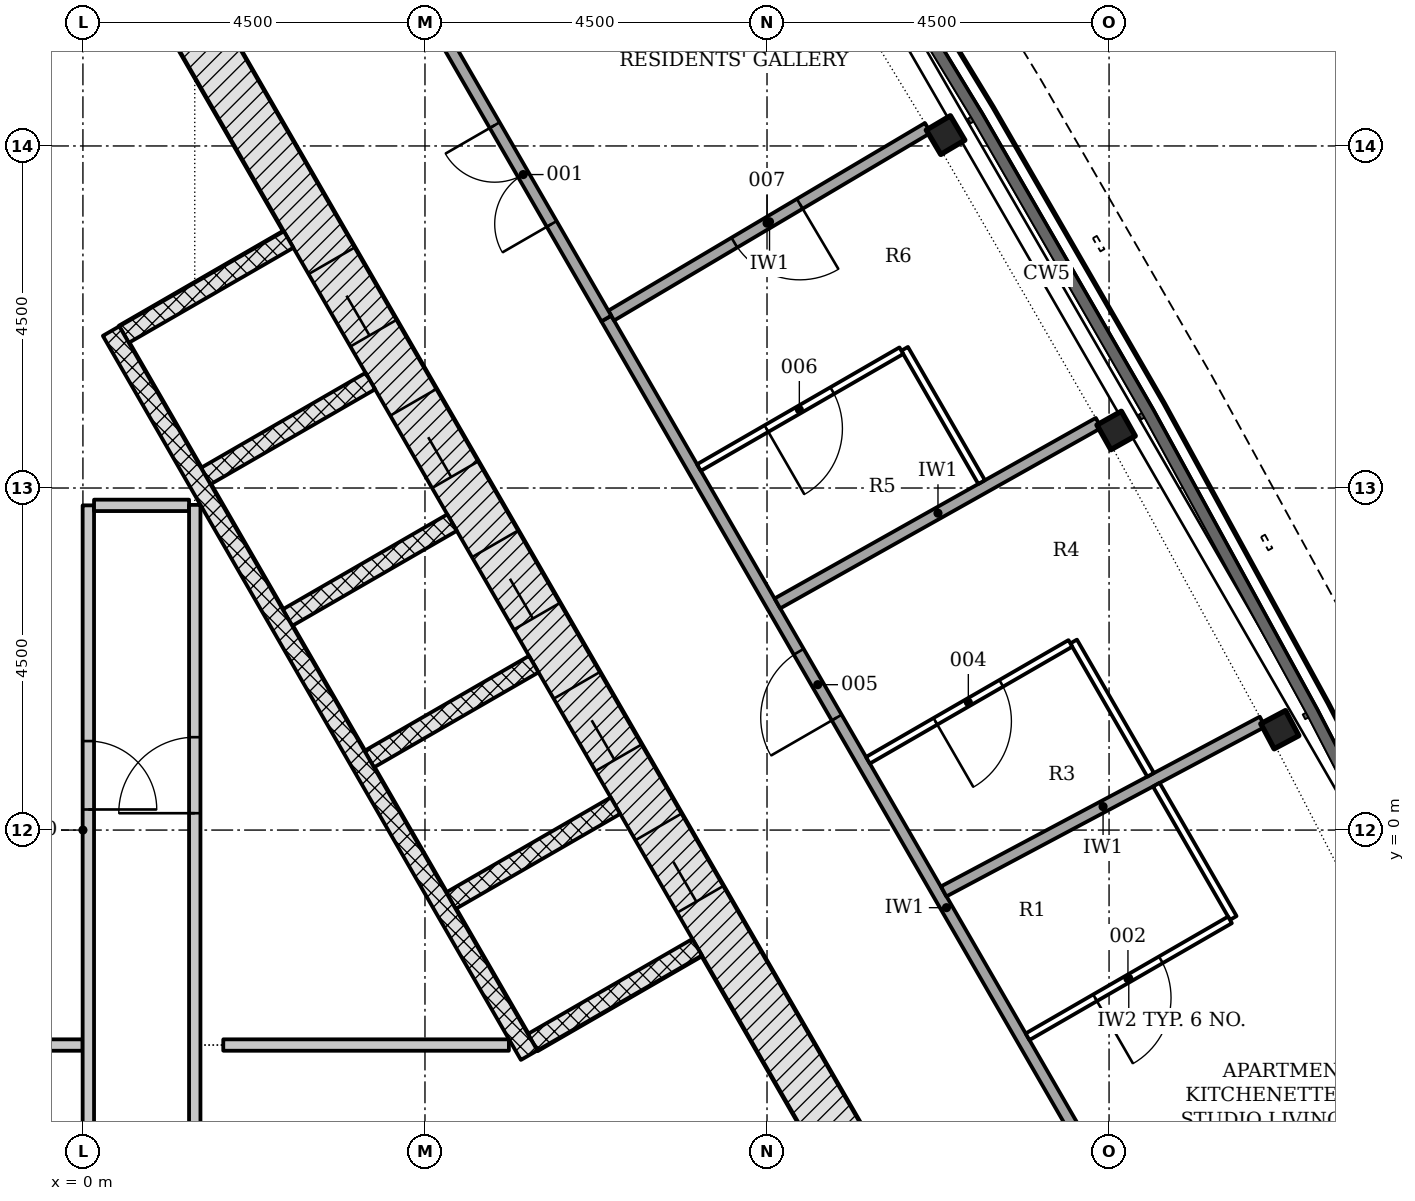
"""IFC4 building model, lengths in metres.
Left out: names, types, materials, properties, quantities, classifications, styles, units other than length and angle.
Written with IfcOpenShell. Run it as: python <this file> out.ifc"""

import sys

from ifc_helpers import new_model, si_unit, direction, frame, frame_2d, origin, origin_2d, place, context, subcontext, project, spatial, polyline, rectangle, i_section, outline, extrude, element, fill, save


model = new_model("IFC4")
c1 = context("Model", 3, precision=1e-05, world=origin(), true_north=direction((0.0, 1.0)))
c2 = subcontext(c1, "Body", "Model", "MODEL_VIEW")
j1 = project(units=[si_unit("LENGTHUNIT", "METRE"), si_unit("PLANEANGLEUNIT", "RADIAN")], contexts=[c1])
p1 = place(None, origin())
s1 = spatial("IfcSite", under=j1, at=p1, CompositionType="ELEMENT")
p2 = place(p1, origin())
s2 = spatial("IfcBuilding", under=s1, at=p2, CompositionType="ELEMENT")
p3 = place(p2, frame((0.0, 0.0, 240.0)))
s3 = spatial("IfcBuildingStorey", under=s2, at=p3, CompositionType="ELEMENT", Elevation=240.0)
p4 = place(p3, frame((10.311, -4.703, -0.2), z_axis=(0.0, 0.0, 1.0), x_axis=(-0.500001446645, 0.866024568562, 0.0)))
e1 = element("IfcWall", 1, at=p4, inside=s3, PredefinedType="SHEAR", context=c2, shape_type="SweptSolid", body=[
    extrude(rectangle(XDim=18.458, YDim=0.7, at=frame_2d((9.229, 0.0))), origin(), (0.0, 0.0, 1.0), 3.6),
])
p5 = place(p4, frame((4.379, 0.0, 0.2)))
e2 = element("IfcOpeningElement", 2, at=p5, cuts=e1, PredefinedType="OPENING", context=c2, shape_type="SweptSolid", body=[
    extrude(rectangle(XDim=1.1, YDim=2.1, at=frame_2d((0.55, 1.05))), frame((0.0, 0.36, 0.0), z_axis=(0.0, -1.0, 0.0), x_axis=(1.0, 0.0, 0.0)), (0.0, 0.0, 1.0), 0.72),
])
p6 = place(p4, frame((6.529, 0.0, 0.2)))
e3 = element("IfcOpeningElement", 3, at=p6, cuts=e1, PredefinedType="OPENING", context=c2, shape_type="SweptSolid", body=[
    extrude(rectangle(XDim=1.1, YDim=2.1, at=frame_2d((0.55, 1.05))), frame((0.0, 0.36, 0.0), z_axis=(0.0, -1.0, 0.0), x_axis=(1.0, 0.0, 0.0)), (0.0, 0.0, 1.0), 0.72),
])
p7 = place(p4, frame((8.679, 0.0, 0.2)))
e4 = element("IfcOpeningElement", 4, at=p7, cuts=e1, PredefinedType="OPENING", context=c2, shape_type="SweptSolid", body=[
    extrude(rectangle(XDim=1.1, YDim=2.1, at=frame_2d((0.55, 1.05))), frame((0.0, 0.36, 0.0), z_axis=(0.0, -1.0, 0.0), x_axis=(1.0, 0.0, 0.0)), (0.0, 0.0, 1.0), 0.72),
])
p8 = place(p4, frame((10.829, 0.0, 0.2)))
e5 = element("IfcOpeningElement", 5, at=p8, cuts=e1, PredefinedType="OPENING", context=c2, shape_type="SweptSolid", body=[
    extrude(rectangle(XDim=1.1, YDim=2.1, at=frame_2d((0.55, 1.05))), frame((0.0, 0.36, 0.0), z_axis=(0.0, -1.0, 0.0), x_axis=(1.0, 0.0, 0.0)), (0.0, 0.0, 1.0), 0.72),
])
p9 = place(p4, frame((12.979, 0.0, 0.2)))
e6 = element("IfcOpeningElement", 6, at=p9, cuts=e1, PredefinedType="OPENING", context=c2, shape_type="SweptSolid", body=[
    extrude(rectangle(XDim=1.1, YDim=2.1, at=frame_2d((0.55, 1.05))), frame((0.0, 0.36, 0.0), z_axis=(0.0, -1.0, 0.0), x_axis=(1.0, 0.0, 0.0)), (0.0, 0.0, 1.0), 0.72),
])
for number, where, z_axis, x_axis in (
    (7, (15.747, 1.32, -0.2), (0.0, 0.0, 1.0), (-0.47, 0.883, 0.0)),
    (8, (13.593, 5.257, -0.2), (0.0, 0.0, 1.0), (-0.49, 0.872, 0.0)),
    (9, (11.349, 9.143, -0.2), (0.0, 0.0, 1.0), (-0.51, 0.86, 0.0)),
):
    element("IfcColumn", number, at=place(p3, frame(where, z_axis=z_axis, x_axis=x_axis)), inside=s3, PredefinedType="COLUMN", context=c2, shape_type="SweptSolid", body=[
        extrude(i_section(OverallWidth=0.373, OverallDepth=0.368, WebThickness=0.015, FlangeThickness=0.024, FilletRadius=0.015, at=origin_2d()), origin(), (0.0, 0.0, 1.0), 3.6),
    ])
p10 = place(p3, origin())
e10 = element("IfcWall", 10, at=p10, inside=s3, PredefinedType="NOTDEFINED", context=c2, shape_type="SweptSolid", body=[
    extrude(outline(polyline([(11.244, -14.641), (13.789, -14.478), (15.241, -14.215), (16.602, -13.646), (17.809, -12.798), (18.804, -11.708), (19.542, -10.431), (19.987, -9.024), (20.119, -7.555), (19.931, -6.091), (19.433, -4.702), (18.301, -2.417), (18.032, -2.55), (19.156, -4.82), (19.638, -6.162), (19.817, -7.56), (19.691, -8.965), (19.266, -10.309), (18.561, -11.53), (17.609, -12.571), (16.456, -13.382), (15.155, -13.926), (13.752, -14.18), (11.225, -14.341), (11.244, -14.641)])), origin(), (0.0, 0.0, 1.0), 3.3),
])
for number, where, z_axis, x_axis in (
    (11, (8.081, -1.541, -0.2), (0.0, 0.0, 1.0), (-0.866, -0.5, 0.0)),
    (12, (7.006, 0.321, -0.2), (0.0, 0.0, 1.0), (-0.866, -0.5, 0.0)),
):
    element("IfcWall", number, at=place(p3, frame(where, z_axis=z_axis, x_axis=x_axis)), inside=s3, PredefinedType="PARTITIONING", context=c2, shape_type="SweptSolid", body=[
        extrude(rectangle(XDim=2.5, YDim=0.25, at=frame_2d((1.25, 0.0))), origin(), (0.0, 0.0, 1.0), 3.6),
    ])
p11 = place(p3, frame((5.931, 2.183, -0.2), z_axis=(0.0, 0.0, 1.0), x_axis=(-0.866047370643, -0.499961950354, 0.0)))
e13 = element("IfcWall", 13, at=p11, inside=s3, PredefinedType="PARTITIONING", context=c2, shape_type="SweptSolid", body=[
    extrude(rectangle(XDim=2.5, YDim=0.25, at=frame_2d((1.25, 0.0))), origin(), (0.0, 0.0, 1.0), 3.6),
])
for number, where, z_axis, x_axis in (
    (14, (4.856, 4.045, -0.2), (0.0, 0.0, 1.0), (-0.866, -0.5, 0.0)),
    (15, (3.781, 5.907, -0.2), (0.0, 0.0, 1.0), (-0.866, -0.5, 0.0)),
    (16, (2.706, 7.769, -0.2), (0.0, 0.0, 1.0), (-0.866, -0.5, 0.0)),
):
    element("IfcWall", number, at=place(p3, frame(where, z_axis=z_axis, x_axis=x_axis)), inside=s3, PredefinedType="PARTITIONING", context=c2, shape_type="SweptSolid", body=[
        extrude(rectangle(XDim=2.5, YDim=0.25, at=frame_2d((1.25, 0.0))), origin(), (0.0, 0.0, 1.0), 3.6),
    ])
p12 = place(p3, frame((5.87, -2.961, 0.0), z_axis=(0.0, 0.0, 1.0), x_axis=(-0.50000615651, 0.866021849293, 0.0)))
e17 = element("IfcWall", 17, at=p12, inside=s3, PredefinedType="PARTITIONING", context=c2, shape_type="SweptSolid", body=[
    extrude(rectangle(XDim=11.0, YDim=0.25, at=frame_2d((5.5, 0.0))), origin(), (0.0, 0.0, 1.0), 3.4),
])
p13 = place(p3, frame((-5.142, -2.828, 0.0), z_axis=(0.0, 0.0, 1.0), x_axis=(1.0, 0.0, 0.0)))
e18 = element("IfcWall", 18, at=p13, inside=s3, PredefinedType="PARTITIONING", context=c2, shape_type="SweptSolid", body=[
    extrude(rectangle(XDim=5.139, YDim=0.15, at=frame_2d((2.569, 0.0))), origin(), (0.0, 0.0, 1.0), 3.4),
])
p14 = place(p3, frame((0.071, 4.272, 0.0), z_axis=(0.0, 0.0, 1.0), x_axis=(0.0, -1.0, 0.0)))
e19 = element("IfcWall", 19, at=p14, inside=s3, PredefinedType="PARTITIONING", context=c2, shape_type="SweptSolid", body=[
    extrude(rectangle(XDim=10.5, YDim=0.15, at=frame_2d((5.25, 0.0))), origin(), (0.0, 0.0, 1.0), 3.4),
])
p15 = place(p14, frame((3.101, 0.0, 0.0)))
e20 = element("IfcOpeningElement", 20, at=p15, cuts=e19, PredefinedType="OPENING", context=c2, shape_type="SweptSolid", body=[
    extrude(rectangle(XDim=0.9, YDim=2.1, at=frame_2d((0.45, 1.05))), frame((0.0, 0.085, 0.0), z_axis=(0.0, -1.0, 0.0), x_axis=(1.0, 0.0, 0.0)), (0.0, 0.0, 1.0), 0.17),
])
p16 = place(p3, frame((0.146, 4.272, 0.0), z_axis=(0.0, 0.0, 1.0), x_axis=(1.0, 0.0, 0.0)))
e21 = element("IfcWall", 21, at=p16, inside=s3, PredefinedType="PARTITIONING", context=c2, shape_type="SweptSolid", body=[
    extrude(rectangle(XDim=1.25, YDim=0.15, at=frame_2d((0.625, 0.0))), origin(), (0.0, 0.0, 1.0), 3.4),
])
p17 = place(p3, frame((1.471, -5.928, 0.0), z_axis=(0.0, 0.0, 1.0), x_axis=(0.0, 1.0, 0.0)))
e22 = element("IfcWall", 22, at=p17, inside=s3, PredefinedType="PARTITIONING", context=c2, shape_type="SweptSolid", body=[
    extrude(rectangle(XDim=10.206, YDim=0.15, at=frame_2d((5.103, 0.0))), origin(), (0.0, 0.0, 1.0), 3.4),
])
p18 = place(p17, frame((6.15, 0.0, 0.0)))
e23 = element("IfcOpeningElement", 23, at=p18, cuts=e22, PredefinedType="OPENING", context=c2, shape_type="SweptSolid", body=[
    extrude(rectangle(XDim=1.0, YDim=2.1, at=frame_2d((0.5, 1.05))), frame((0.0, 0.085, 0.0), z_axis=(0.0, -1.0, 0.0), x_axis=(1.0, 0.0, 0.0)), (0.0, 0.0, 1.0), 0.17),
])
p19 = place(p3, frame((1.846, -2.828, 0.0), z_axis=(0.0, 0.0, 1.0), x_axis=(1.0, 0.0, 0.0)))
e24 = element("IfcWall", 24, at=p19, inside=s3, PredefinedType="PARTITIONING", context=c2, shape_type="SweptSolid", body=[
    extrude(rectangle(XDim=3.758, YDim=0.15, at=frame_2d((1.879, 0.0))), origin(), (0.0, 0.0, 1.0), 3.4),
])
p20 = place(p3, frame((15.836, -8.772, 0.0), z_axis=(0.0, 0.0, 1.0), x_axis=(-0.500001479768, 0.866024549438, 0.0)))
e25 = element("IfcWall", 25, at=p20, inside=s3, PredefinedType="PARTITIONING", context=c2, shape_type="SweptSolid", body=[
    extrude(rectangle(XDim=17.9, YDim=0.15, at=frame_2d((8.95, 0.0))), origin(), (0.0, 0.0, 1.0), 2.852),
])
p21 = place(p20, frame((2.973, 0.0, 0.0)))
e26 = element("IfcOpeningElement", 26, at=p21, cuts=e25, PredefinedType="OPENING", context=c2, shape_type="SweptSolid", body=[
    extrude(rectangle(XDim=1.0, YDim=2.1, at=frame_2d((0.5, 1.05))), frame((0.0, 0.085, 0.0), z_axis=(0.0, -1.0, 0.0), x_axis=(1.0, 0.0, 0.0)), (0.0, 0.0, 1.0), 0.17),
])
p22 = place(p20, frame((11.837, 0.0, 0.0)))
e27 = element("IfcOpeningElement", 27, at=p22, cuts=e25, PredefinedType="OPENING", context=c2, shape_type="SweptSolid", body=[
    extrude(rectangle(XDim=1.0, YDim=2.1, at=frame_2d((0.5, 1.05))), frame((0.0, 0.085, 0.0), z_axis=(0.0, -1.0, 0.0), x_axis=(1.0, 0.0, 0.0)), (0.0, 0.0, 1.0), 0.17),
])
p23 = place(p3, frame((11.116, 9.238, 0.0), z_axis=(0.0, 0.0, 1.0), x_axis=(-0.860234203322, -0.509899122803, 0.0)))
e28 = element("IfcWall", 28, at=p23, inside=s3, PredefinedType="PARTITIONING", context=c2, shape_type="SweptSolid", body=[
    extrude(rectangle(XDim=4.843, YDim=0.15, at=frame_2d((2.421, 0.0))), origin(), (0.0, 0.0, 1.0), 3.4),
])
p24 = place(p23, frame((1.959, 0.0, 0.0)))
e29 = element("IfcOpeningElement", 29, at=p24, cuts=e28, PredefinedType="OPENING", context=c2, shape_type="SweptSolid", body=[
    extrude(rectangle(XDim=1.0, YDim=2.1, at=frame_2d((0.5, 1.05))), frame((0.0, 0.085, 0.0), z_axis=(0.0, -1.0, 0.0), x_axis=(1.0, 0.0, 0.0)), (0.0, 0.0, 1.0), 0.17),
])
p25 = place(p3, frame((6.886, 6.73, 0.0), z_axis=(0.0, 0.0, 1.0), x_axis=(-0.499999494409, 0.866025695687, 0.0)))
e30 = element("IfcWall", 30, at=p25, inside=s3, PredefinedType="PARTITIONING", context=c2, shape_type="SweptSolid", body=[
    extrude(rectangle(XDim=4.374, YDim=0.15, at=frame_2d((2.187, 0.0))), origin(), (0.0, 0.0, 1.0), 2.852),
])
p26 = place(p25, frame((1.437, 0.0, 0.0)))
e31 = element("IfcOpeningElement", 31, at=p26, cuts=e30, PredefinedType="OPENING", context=c2, shape_type="SweptSolid", body=[
    extrude(rectangle(XDim=1.5, YDim=2.1, at=frame_2d((0.75, 1.05))), frame((0.0, 0.085, 0.0), z_axis=(0.0, -1.0, 0.0), x_axis=(1.0, 0.0, 0.0)), (0.0, 0.0, 1.0), 0.17),
])
p27 = place(p3, frame((14.122, 0.597, 0.0), z_axis=(0.0, 0.0, 1.0), x_axis=(0.499990325971, -0.866030989016, 0.0)))
e32 = element("IfcWall", 32, at=p27, inside=s3, PredefinedType="PARTITIONING", context=c2, shape_type="SweptSolid", body=[
    extrude(rectangle(XDim=2.025, YDim=0.1, at=frame_2d((1.012, 0.0))), origin(), (0.0, 0.0, 1.0), 2.852),
])
p28 = place(p3, frame((15.091, -1.182, 0.0), z_axis=(0.0, 0.0, 1.0), x_axis=(-0.866016353143, -0.500015675843, 0.0)))
e33 = element("IfcWall", 33, at=p28, inside=s3, PredefinedType="PARTITIONING", context=c2, shape_type="SweptSolid", body=[
    extrude(rectangle(XDim=3.075, YDim=0.1, at=frame_2d((1.538, 0.0))), origin(), (0.0, 0.0, 1.0), 3.4),
])
p29 = place(p28, frame((1.05, 0.0, 0.0)))
e34 = element("IfcOpeningElement", 34, at=p29, cuts=e33, PredefinedType="OPENING", context=c2, shape_type="SweptSolid", body=[
    extrude(rectangle(XDim=1.0, YDim=2.1, at=frame_2d((0.5, 1.05))), frame((0.0, 0.06, 0.0), z_axis=(0.0, -1.0, 0.0), x_axis=(1.0, 0.0, 0.0)), (0.0, 0.0, 1.0), 0.12),
])
p30 = place(p3, frame((15.518, 1.425, 0.0), z_axis=(0.0, 0.0, 1.0), x_axis=(-0.882718227231, -0.469902682812, 0.0)))
e35 = element("IfcWall", 35, at=p30, inside=s3, PredefinedType="PARTITIONING", context=c2, shape_type="SweptSolid", body=[
    extrude(rectangle(XDim=4.751, YDim=0.15, at=frame_2d((2.375, 0.0))), origin(), (0.0, 0.0, 1.0), 3.4),
])
p31 = place(p3, frame((14.047, 0.727, 0.0), z_axis=(0.0, 0.0, 1.0), x_axis=(-0.499990325971, 0.866030989016, 0.0)))
e36 = element("IfcWall", 36, at=p31, inside=s3, PredefinedType="PARTITIONING", context=c2, shape_type="SweptSolid", body=[
    extrude(rectangle(XDim=2.025, YDim=0.1, at=frame_2d((1.012, 0.0))), origin(), (0.0, 0.0, 1.0), 3.4),
])
p32 = place(p3, frame((12.991, 2.456, 0.0), z_axis=(0.0, 0.0, 1.0), x_axis=(-0.866030883713, -0.499990508365, 0.0)))
e37 = element("IfcWall", 37, at=p32, inside=s3, PredefinedType="PARTITIONING", context=c2, shape_type="SweptSolid", body=[
    extrude(rectangle(XDim=3.075, YDim=0.1, at=frame_2d((1.537, 0.0))), origin(), (0.0, 0.0, 1.0), 3.4),
])
p33 = place(p32, frame((1.05, 0.0, 0.0)))
e38 = element("IfcOpeningElement", 38, at=p33, cuts=e37, PredefinedType="OPENING", context=c2, shape_type="SweptSolid", body=[
    extrude(rectangle(XDim=1.0, YDim=2.1, at=frame_2d((0.5, 1.05))), frame((0.0, 0.06, 0.0), z_axis=(0.0, -1.0, 0.0), x_axis=(1.0, 0.0, 0.0)), (0.0, 0.0, 1.0), 0.12),
])
p34 = place(p3, frame((13.362, 5.357, 0.0), z_axis=(0.0, 0.0, 1.0), x_axis=(-0.871708672205, -0.490024479799, 0.0)))
e39 = element("IfcWall", 39, at=p34, inside=s3, PredefinedType="PARTITIONING", context=c2, shape_type="SweptSolid", body=[
    extrude(rectangle(XDim=4.847, YDim=0.15, at=frame_2d((2.424, 0.0))), origin(), (0.0, 0.0, 1.0), 3.4),
])
p35 = place(p3, frame((11.823, 4.578, 0.0), z_axis=(0.0, 0.0, 1.0), x_axis=(-0.499990325971, 0.866030989016, 0.0)))
e40 = element("IfcWall", 40, at=p35, inside=s3, PredefinedType="PARTITIONING", context=c2, shape_type="SweptSolid", body=[
    extrude(rectangle(XDim=2.025, YDim=0.1, at=frame_2d((1.012, 0.0))), origin(), (0.0, 0.0, 1.0), 3.4),
])
p36 = place(p3, frame((10.768, 6.306, 0.0), z_axis=(0.0, 0.0, 1.0), x_axis=(-0.866050731258, -0.499956128963, 0.0)))
e41 = element("IfcWall", 41, at=p36, inside=s3, PredefinedType="PARTITIONING", context=c2, shape_type="SweptSolid", body=[
    extrude(rectangle(XDim=3.075, YDim=0.1, at=frame_2d((1.538, 0.0))), origin(), (0.0, 0.0, 1.0), 3.4),
])
p37 = place(p36, frame((1.05, 0.0, 0.0)))
e42 = element("IfcOpeningElement", 42, at=p37, cuts=e41, PredefinedType="OPENING", context=c2, shape_type="SweptSolid", body=[
    extrude(rectangle(XDim=1.0, YDim=2.1, at=frame_2d((0.5, 1.05))), frame((0.0, 0.06, 0.0), z_axis=(0.0, -1.0, 0.0), x_axis=(1.0, 0.0, 0.0)), (0.0, 0.0, 1.0), 0.12),
])
p38 = place(p5, origin())
e43 = element("IfcDoor", 43, at=p38, inside=s3, OperationType="DOUBLE_DOOR_SLIDING", PredefinedType="DOOR", context=c2, shape_type="SweptSolid", body=[
    extrude(rectangle(XDim=1.1, YDim=2.1, at=frame_2d((0.55, 1.05))), frame((0.0, 0.025, 0.0), z_axis=(0.0, -1.0, 0.0), x_axis=(1.0, 0.0, 0.0)), (0.0, 0.0, 1.0), 0.05),
])
fill(e2, e43)
p39 = place(p6, origin())
e44 = element("IfcDoor", 44, at=p39, inside=s3, OperationType="DOUBLE_DOOR_SLIDING", PredefinedType="DOOR", context=c2, shape_type="SweptSolid", body=[
    extrude(rectangle(XDim=1.1, YDim=2.1, at=frame_2d((0.55, 1.05))), frame((0.0, 0.025, 0.0), z_axis=(0.0, -1.0, 0.0), x_axis=(1.0, 0.0, 0.0)), (0.0, 0.0, 1.0), 0.05),
])
fill(e3, e44)
p40 = place(p7, origin())
e45 = element("IfcDoor", 45, at=p40, inside=s3, OperationType="DOUBLE_DOOR_SLIDING", PredefinedType="DOOR", context=c2, shape_type="SweptSolid", body=[
    extrude(rectangle(XDim=1.1, YDim=2.1, at=frame_2d((0.55, 1.05))), frame((0.0, 0.025, 0.0), z_axis=(0.0, -1.0, 0.0), x_axis=(1.0, 0.0, 0.0)), (0.0, 0.0, 1.0), 0.05),
])
fill(e4, e45)
p41 = place(p8, origin())
e46 = element("IfcDoor", 46, at=p41, inside=s3, OperationType="DOUBLE_DOOR_SLIDING", PredefinedType="DOOR", context=c2, shape_type="SweptSolid", body=[
    extrude(rectangle(XDim=1.1, YDim=2.1, at=frame_2d((0.55, 1.05))), frame((0.0, 0.025, 0.0), z_axis=(0.0, -1.0, 0.0), x_axis=(1.0, 0.0, 0.0)), (0.0, 0.0, 1.0), 0.05),
])
fill(e5, e46)
p42 = place(p9, origin())
e47 = element("IfcDoor", 47, at=p42, inside=s3, OperationType="DOUBLE_DOOR_SLIDING", PredefinedType="DOOR", context=c2, shape_type="SweptSolid", body=[
    extrude(rectangle(XDim=1.1, YDim=2.1, at=frame_2d((0.55, 1.05))), frame((0.0, 0.025, 0.0), z_axis=(0.0, -1.0, 0.0), x_axis=(1.0, 0.0, 0.0)), (0.0, 0.0, 1.0), 0.05),
])
fill(e6, e47)
p43 = place(p15, origin())
e48 = element("IfcDoor", 48, at=p43, inside=s3, OperationType="SINGLE_SWING_RIGHT", PredefinedType="DOOR", context=c2, shape_type="SweptSolid", body=[
    extrude(rectangle(XDim=0.9, YDim=2.1, at=frame_2d((0.45, 1.05))), frame((0.0, 0.025, 0.0), z_axis=(0.0, -1.0, 0.0), x_axis=(1.0, 0.0, 0.0)), (0.0, 0.0, 1.0), 0.05),
])
fill(e20, e48)
p44 = place(p18, origin())
e49 = element("IfcDoor", 49, at=p44, inside=s3, OperationType="SINGLE_SWING_LEFT", PredefinedType="DOOR", context=c2, shape_type="SweptSolid", body=[
    extrude(rectangle(XDim=1.0, YDim=2.1, at=frame_2d((0.5, 1.05))), frame((0.0, 0.025, 0.0), z_axis=(0.0, -1.0, 0.0), x_axis=(1.0, 0.0, 0.0)), (0.0, 0.0, 1.0), 0.05),
])
fill(e23, e49)
p45 = place(p26, origin())
e50 = element("IfcDoor", 50, at=p45, inside=s3, OperationType="DOUBLE_DOOR_SINGLE_SWING", PredefinedType="DOOR", context=c2, shape_type="SweptSolid", body=[
    extrude(rectangle(XDim=1.5, YDim=2.1, at=frame_2d((0.75, 1.05))), frame((0.0, 0.025, 0.0), z_axis=(0.0, -1.0, 0.0), x_axis=(1.0, 0.0, 0.0)), (0.0, 0.0, 1.0), 0.05),
])
fill(e31, e50)
p46 = place(p29, origin())
e51 = element("IfcDoor", 51, at=p46, inside=s3, OperationType="SINGLE_SWING_RIGHT", PredefinedType="DOOR", context=c2, shape_type="SweptSolid", body=[
    extrude(rectangle(XDim=1.0, YDim=2.1, at=frame_2d((0.5, 1.05))), frame((0.0, 0.025, 0.0), z_axis=(0.0, -1.0, 0.0), x_axis=(1.0, 0.0, 0.0)), (0.0, 0.0, 1.0), 0.05),
])
fill(e34, e51)
p47 = place(p33, origin())
e52 = element("IfcDoor", 52, at=p47, inside=s3, OperationType="SINGLE_SWING_RIGHT", PredefinedType="DOOR", context=c2, shape_type="SweptSolid", body=[
    extrude(rectangle(XDim=1.0, YDim=2.1, at=frame_2d((0.5, 1.05))), frame((0.0, 0.025, 0.0), z_axis=(0.0, -1.0, 0.0), x_axis=(1.0, 0.0, 0.0)), (0.0, 0.0, 1.0), 0.05),
])
fill(e38, e52)
p48 = place(p22, origin())
e53 = element("IfcDoor", 53, at=p48, inside=s3, OperationType="SINGLE_SWING_LEFT", PredefinedType="DOOR", context=c2, shape_type="SweptSolid", body=[
    extrude(rectangle(XDim=1.0, YDim=2.1, at=frame_2d((0.5, 1.05))), frame((0.0, 0.025, 0.0), z_axis=(0.0, -1.0, 0.0), x_axis=(1.0, 0.0, 0.0)), (0.0, 0.0, 1.0), 0.05),
])
fill(e27, e53)
p49 = place(p37, origin())
e54 = element("IfcDoor", 54, at=p49, inside=s3, OperationType="SINGLE_SWING_RIGHT", PredefinedType="DOOR", context=c2, shape_type="SweptSolid", body=[
    extrude(rectangle(XDim=1.0, YDim=2.1, at=frame_2d((0.5, 1.05))), frame((0.0, 0.025, 0.0), z_axis=(0.0, -1.0, 0.0), x_axis=(1.0, 0.0, 0.0)), (0.0, 0.0, 1.0), 0.05),
])
fill(e42, e54)
p50 = place(p24, origin())
e55 = element("IfcDoor", 55, at=p50, inside=s3, OperationType="SINGLE_SWING_LEFT", PredefinedType="DOOR", context=c2, shape_type="SweptSolid", body=[
    extrude(rectangle(XDim=1.0, YDim=2.1, at=frame_2d((0.5, 1.05))), frame((0.0, 0.025, 0.0), z_axis=(0.0, -1.0, 0.0), x_axis=(1.0, 0.0, 0.0)), (0.0, 0.0, 1.0), 0.05),
])
fill(e29, e55)
save(model, sys.argv[1])
